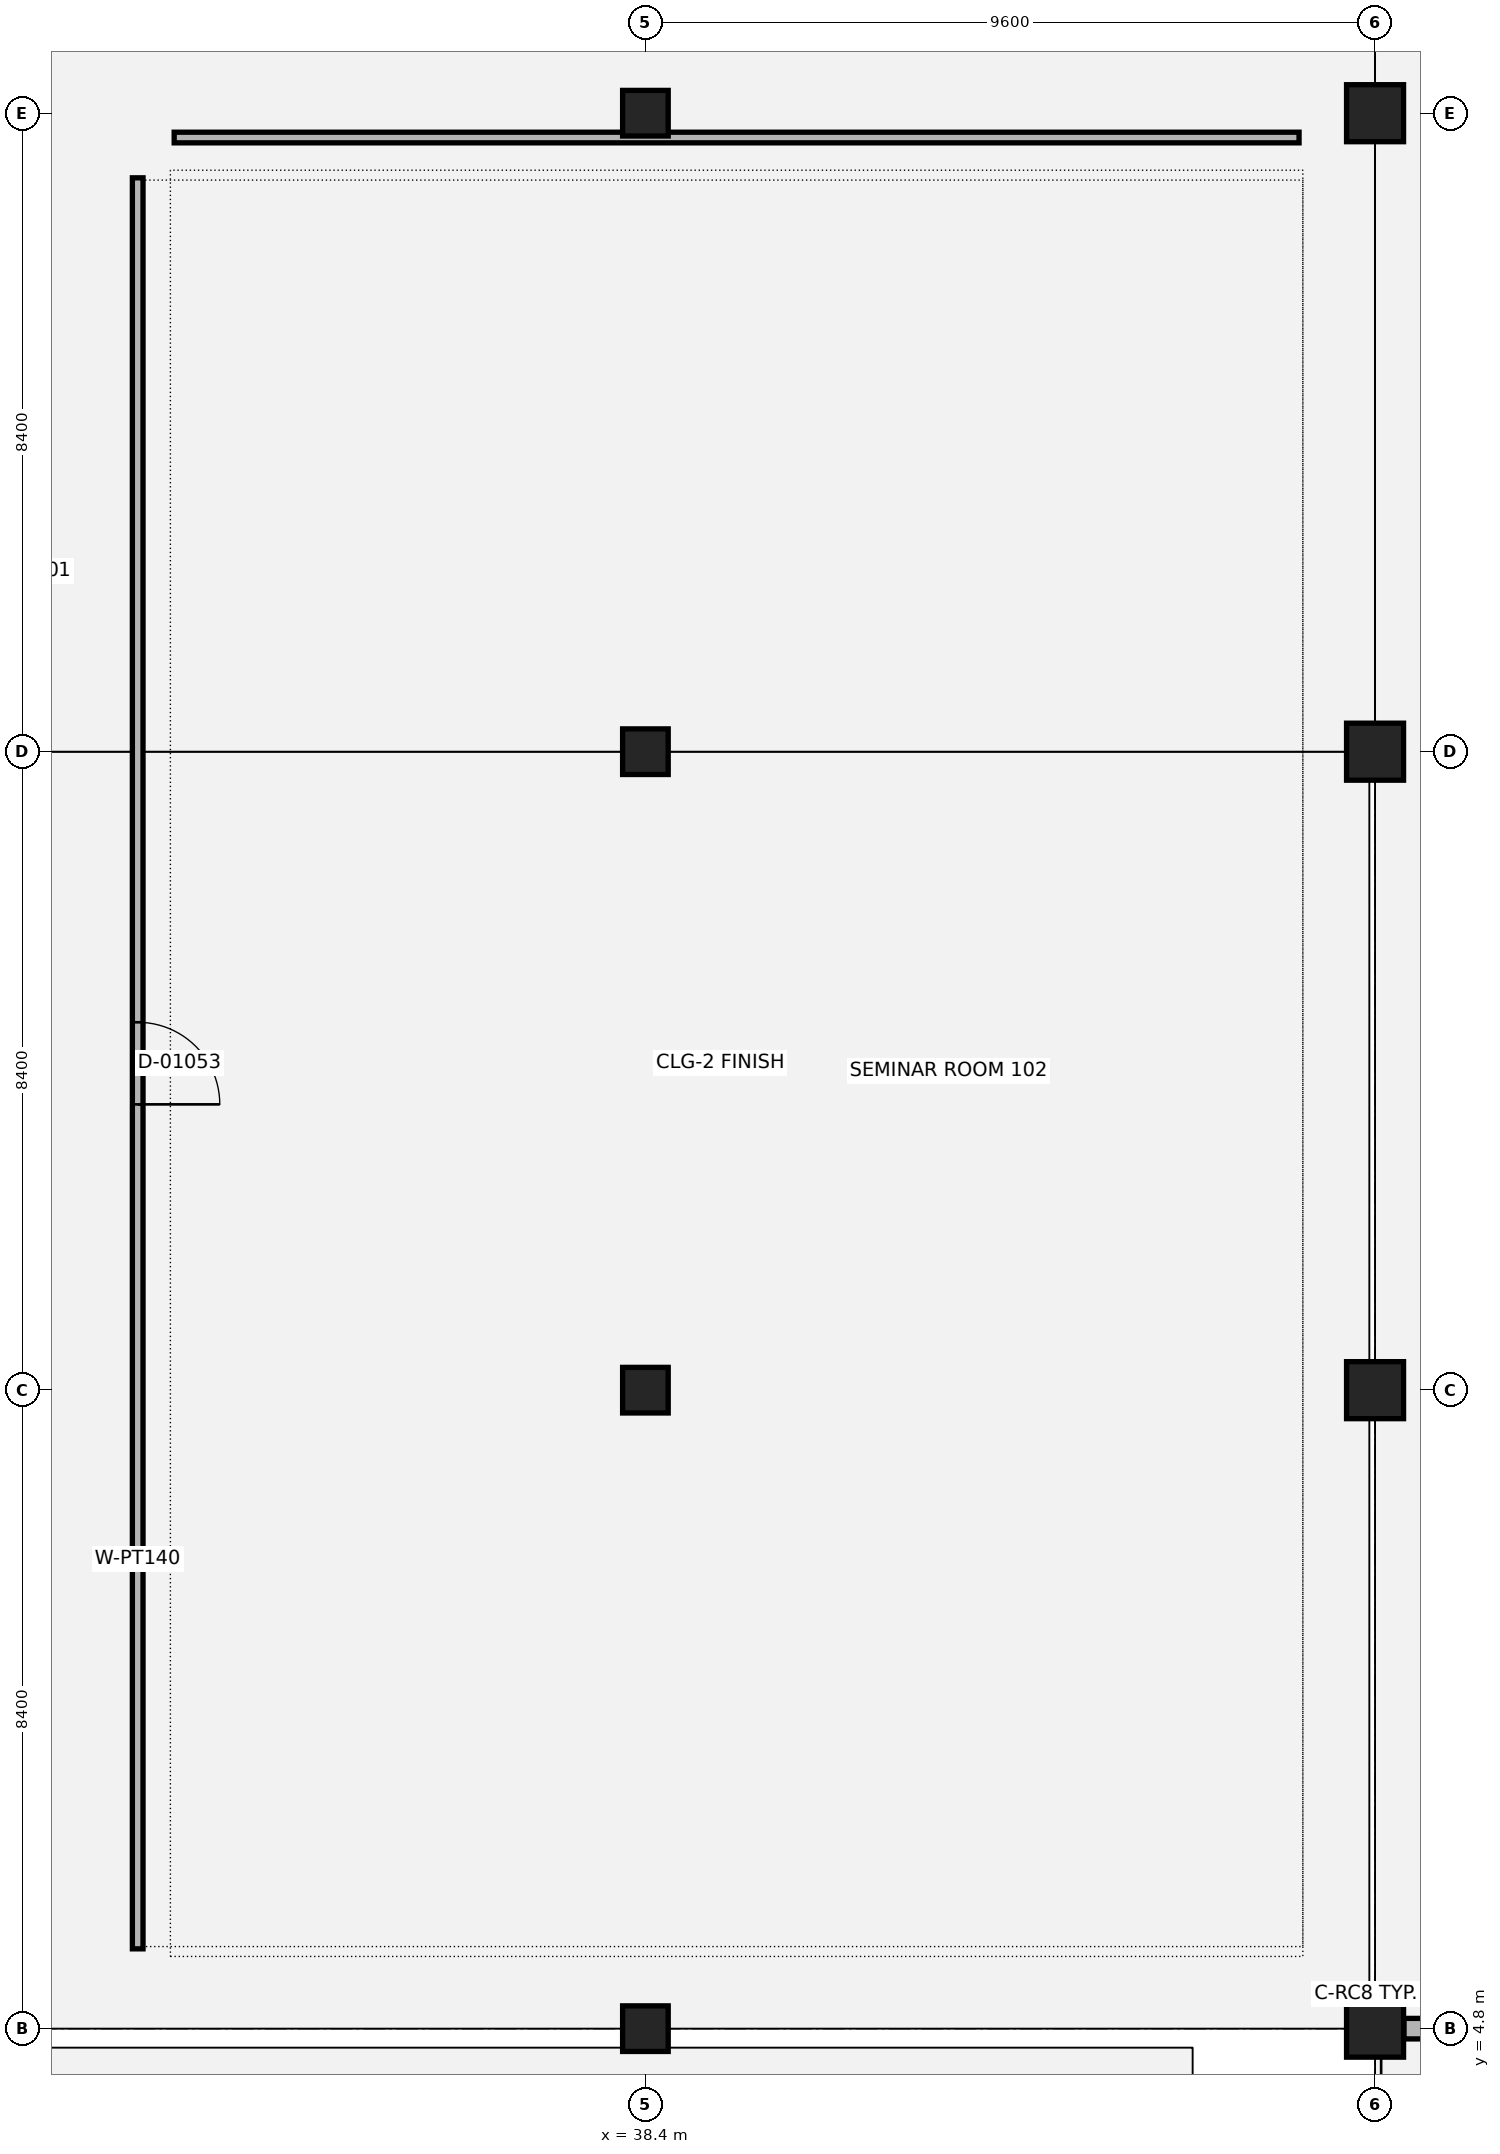
"""IFC4 building model, lengths in metres.
Left out: names, types, materials, properties, quantities, classifications, styles, units other than length and angle.
Written with IfcOpenShell. Run it as: python <this file> out.ifc"""

import sys

from ifc_helpers import new_model, si_unit, direction, frame, frame_2d, origin, origin_2d, place, context, subcontext, project, spatial, rectangle, extrude, element, fill, save


model = new_model("IFC4")
c1 = context("Model", 3, precision=1e-05, world=origin(), true_north=direction((0.0, 1.0)))
c2 = subcontext(c1, "Body", "Model", "MODEL_VIEW")
j1 = project(units=[si_unit("LENGTHUNIT", "METRE"), si_unit("PLANEANGLEUNIT", "RADIAN")], contexts=[c1])
p1 = place(None, origin())
s1 = spatial("IfcSite", under=j1, at=p1, CompositionType="ELEMENT")
p2 = place(p1, origin())
s2 = spatial("IfcBuilding", under=s1, at=p2, CompositionType="ELEMENT")
p3 = place(p2, frame((0.0, 0.0, 5.4)))
s3 = spatial("IfcBuildingStorey", under=s2, at=p3, CompositionType="ELEMENT", Elevation=5.4)
for number, where, z_axis, x_axis in (
    (1, (38.4, 4.8, 0.0), (0.0, 0.0, 1.0), (1.0, 0.0, 0.0)),
    (2, (38.4, 13.2, 0.0), (0.0, 0.0, 1.0), (1.0, 0.0, 0.0)),
    (3, (38.4, 21.6, 0.0), (0.0, 0.0, 1.0), (1.0, 0.0, 0.0)),
    (4, (38.4, 30.0, 0.0), (0.0, 0.0, 1.0), (1.0, 0.0, 0.0)),
):
    element("IfcColumn", number, at=place(p3, frame(where, z_axis=z_axis, x_axis=x_axis)), inside=s3, PredefinedType="COLUMN", context=c2, shape_type="SweptSolid", body=[
        extrude(rectangle(XDim=0.6, YDim=0.6, at=origin_2d()), origin(), (0.0, 0.0, 1.0), 4.8),
    ])
for number, where, z_axis, x_axis in (
    (5, (48.0, 4.8, 0.0), (0.0, 0.0, 1.0), (1.0, 0.0, 0.0)),
    (6, (48.0, 13.2, 0.0), (0.0, 0.0, 1.0), (1.0, 0.0, 0.0)),
    (7, (48.0, 21.6, 0.0), (0.0, 0.0, 1.0), (1.0, 0.0, 0.0)),
    (8, (48.0, 30.0, 0.0), (0.0, 0.0, 1.0), (1.0, 0.0, 0.0)),
):
    element("IfcColumn", number, at=place(p3, frame(where, z_axis=z_axis, x_axis=x_axis)), inside=s3, PredefinedType="COLUMN", context=c2, shape_type="SweptSolid", body=[
        extrude(rectangle(XDim=0.75, YDim=0.75, at=origin_2d()), origin(), (0.0, 0.0, 1.0), 4.8),
    ])
p4 = place(p3, frame((48.38, 4.8, 0.0), z_axis=(0.0, 0.0, 1.0), x_axis=(1.0, 0.0, 0.0)))
e9 = element("IfcWall", 9, at=p4, inside=s3, PredefinedType="SOLIDWALL", context=c2, shape_type="SweptSolid", body=[
    extrude(rectangle(XDim=8.84, YDim=0.27, at=frame_2d((4.42, 0.0))), origin(), (0.0, 0.0, 1.0), 3.28),
])
p5 = place(p4, frame((3.745, 0.0, 0.0)))
e10 = element("IfcOpeningElement", 10, at=p5, cuts=e9, PredefinedType="OPENING", context=c2, shape_type="SweptSolid", body=[
    extrude(rectangle(XDim=1.35, YDim=2.15, at=frame_2d((0.675, 1.075))), frame((0.0, 0.145, 0.0), z_axis=(0.0, -1.0, 0.0), x_axis=(1.0, 0.0, 0.0)), (0.0, 0.0, 1.0), 0.29),
])
p6 = place(p3, frame((31.72, 5.85, 0.0), z_axis=(0.0, 0.0, 1.0), x_axis=(0.0, 1.0, 0.0)))
e11 = element("IfcWall", 11, at=p6, inside=s3, PredefinedType="PARTITIONING", context=c2, shape_type="SweptSolid", body=[
    extrude(rectangle(XDim=23.3, YDim=0.14, at=frame_2d((11.65, 0.0))), origin(), (0.0, 0.0, 1.0), 3.26),
])
p7 = place(p6, frame((11.11, 0.0, 0.0)))
e12 = element("IfcOpeningElement", 12, at=p7, cuts=e11, PredefinedType="OPENING", context=c2, shape_type="SweptSolid", body=[
    extrude(rectangle(XDim=1.08, YDim=2.15, at=frame_2d((0.54, 1.075))), frame((0.0, 0.08, 0.0), z_axis=(0.0, -1.0, 0.0), x_axis=(1.0, 0.0, 0.0)), (0.0, 0.0, 1.0), 0.16),
])
p8 = place(p3, frame((32.2, 29.68, 0.0), z_axis=(0.0, 0.0, 1.0), x_axis=(1.0, 0.0, 0.0)))
e13 = element("IfcWall", 13, at=p8, inside=s3, PredefinedType="PARTITIONING", context=c2, shape_type="SweptSolid", body=[
    extrude(rectangle(XDim=14.8, YDim=0.14, at=frame_2d((7.4, 0.0))), origin(), (0.0, 0.0, 1.0), 3.26),
])
p9 = place(p7, origin())
e14 = element("IfcDoor", 14, at=p9, inside=s3, OperationType="SINGLE_SWING_RIGHT", PredefinedType="DOOR", context=c2, shape_type="SweptSolid", body=[
    extrude(rectangle(XDim=1.08, YDim=2.15, at=frame_2d((0.54, 1.075))), frame((0.0, 0.025, 0.0), z_axis=(0.0, -1.0, 0.0), x_axis=(1.0, 0.0, 0.0)), (0.0, 0.0, 1.0), 0.05),
])
fill(e12, e14)
save(model, sys.argv[1])
